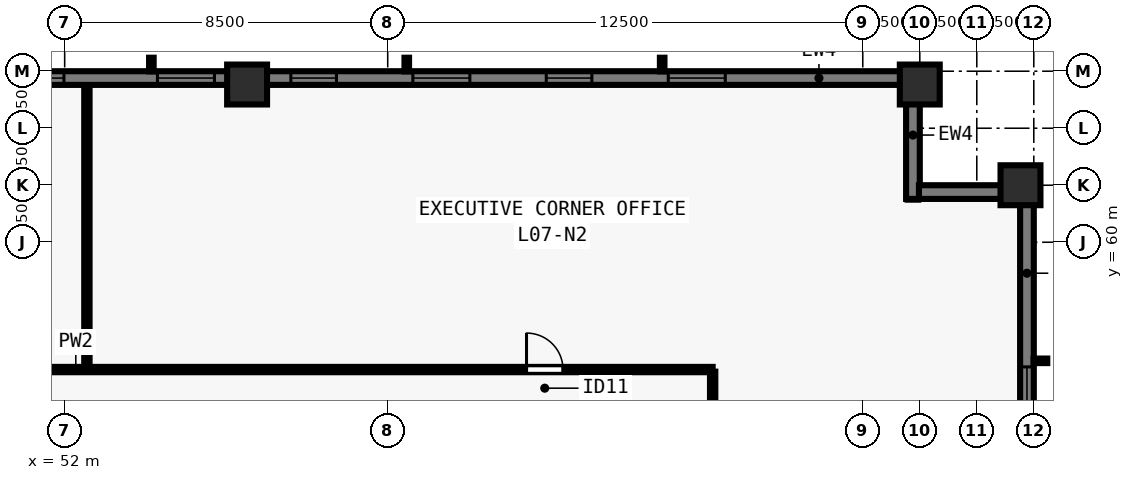
"""IFC4 building model, lengths in metres.
Left out: names, types, materials, properties, quantities, classifications, styles, units other than length and angle.
Written with IfcOpenShell. Run it as: python <this file> out.ifc"""

import sys

from ifc_helpers import new_model, si_unit, direction, frame, frame_2d, origin, origin_2d, place, context, subcontext, project, spatial, rectangle, extrude, element, fill, save


model = new_model("IFC4")
c1 = context("Model", 3, precision=1e-05, world=origin(), true_north=direction((0.0, 1.0)))
c2 = subcontext(c1, "Body", "Model", "MODEL_VIEW")
j1 = project(units=[si_unit("LENGTHUNIT", "METRE"), si_unit("PLANEANGLEUNIT", "RADIAN")], contexts=[c1])
p1 = place(None, origin())
s1 = spatial("IfcSite", under=j1, at=p1, CompositionType="ELEMENT")
p2 = place(p1, origin())
s2 = spatial("IfcBuilding", under=s1, at=p2, CompositionType="ELEMENT")
p3 = place(p2, frame((0.0, 0.0, 30.5)))
s3 = spatial("IfcBuildingStorey", under=s2, at=p3, CompositionType="ELEMENT", Elevation=30.5)
for number, where, z_axis, x_axis in (
    (1, (77.15, 61.5, 0.0), (0.0, 0.0, 1.0), (0.0, 1.0, 0.0)),
    (2, (74.5, 64.15, 0.0), (0.0, 0.0, 1.0), (1.0, 0.0, 0.0)),
    (3, (56.8, 64.15, 0.0), (0.0, 0.0, 1.0), (1.0, 0.0, 0.0)),
):
    element("IfcColumn", number, at=place(p3, frame(where, z_axis=z_axis, x_axis=x_axis)), inside=s3, PredefinedType="COLUMN", context=c2, shape_type="SweptSolid", body=[
        extrude(rectangle(XDim=1.05, YDim=1.05, at=origin_2d()), origin(), (0.0, 0.0, 1.0), 3.5),
    ])
p4 = place(p3, frame((29.5, 64.32, 0.0), z_axis=(0.0, 0.0, 1.0), x_axis=(1.0, 0.0, 0.0)))
e4 = element("IfcWall", 4, at=p4, inside=s3, PredefinedType="SOLIDWALL", context=c2, shape_type="SweptSolid", body=[
    extrude(rectangle(XDim=44.662, YDim=0.36, at=frame_2d((22.331, 0.0))), origin(), (0.0, 0.0, 1.0), 3.28),
])
p5 = place(p4, frame((4.78, 0.0, 0.8)))
e5 = element("IfcOpeningElement", 5, at=p5, cuts=e4, PredefinedType="OPENING", context=c2, shape_type="SweptSolid", body=[
    extrude(rectangle(XDim=1.5, YDim=1.544, at=frame_2d((0.75, 0.772))), frame((0.0, 0.19, 0.0), z_axis=(0.0, -1.0, 0.0), x_axis=(1.0, 0.0, 0.0)), (0.0, 0.0, 1.0), 0.38),
])
p6 = place(p4, frame((8.29, 0.0, 0.8)))
e6 = element("IfcOpeningElement", 6, at=p6, cuts=e4, PredefinedType="OPENING", context=c2, shape_type="SweptSolid", body=[
    extrude(rectangle(XDim=1.2, YDim=1.544, at=frame_2d((0.6, 0.772))), frame((0.0, 0.19, 0.0), z_axis=(0.0, -1.0, 0.0), x_axis=(1.0, 0.0, 0.0)), (0.0, 0.0, 1.0), 0.38),
])
p7 = place(p4, frame((11.5, 0.0, 0.8)))
e7 = element("IfcOpeningElement", 7, at=p7, cuts=e4, PredefinedType="OPENING", context=c2, shape_type="SweptSolid", body=[
    extrude(rectangle(XDim=1.5, YDim=1.544, at=frame_2d((0.75, 0.772))), frame((0.0, 0.19, 0.0), z_axis=(0.0, -1.0, 0.0), x_axis=(1.0, 0.0, 0.0)), (0.0, 0.0, 1.0), 0.38),
])
p8 = place(p4, frame((15.01, 0.0, 0.8)))
e8 = element("IfcOpeningElement", 8, at=p8, cuts=e4, PredefinedType="OPENING", context=c2, shape_type="SweptSolid", body=[
    extrude(rectangle(XDim=1.2, YDim=1.544, at=frame_2d((0.6, 0.772))), frame((0.0, 0.19, 0.0), z_axis=(0.0, -1.0, 0.0), x_axis=(1.0, 0.0, 0.0)), (0.0, 0.0, 1.0), 0.38),
])
p9 = place(p4, frame((18.671, 0.0, 0.8)))
e9 = element("IfcOpeningElement", 9, at=p9, cuts=e4, PredefinedType="OPENING", context=c2, shape_type="SweptSolid", body=[
    extrude(rectangle(XDim=1.5, YDim=1.544, at=frame_2d((0.75, 0.772))), frame((0.0, 0.19, 0.0), z_axis=(0.0, -1.0, 0.0), x_axis=(1.0, 0.0, 0.0)), (0.0, 0.0, 1.0), 0.38),
])
p10 = place(p4, frame((21.281, 0.0, 0.8)))
e10 = element("IfcOpeningElement", 10, at=p10, cuts=e4, PredefinedType="OPENING", context=c2, shape_type="SweptSolid", body=[
    extrude(rectangle(XDim=1.2, YDim=1.544, at=frame_2d((0.6, 0.772))), frame((0.0, 0.19, 0.0), z_axis=(0.0, -1.0, 0.0), x_axis=(1.0, 0.0, 0.0)), (0.0, 0.0, 1.0), 0.38),
])
p11 = place(p4, frame((24.941, 0.0, 0.8)))
e11 = element("IfcOpeningElement", 11, at=p11, cuts=e4, PredefinedType="OPENING", context=c2, shape_type="SweptSolid", body=[
    extrude(rectangle(XDim=1.5, YDim=1.544, at=frame_2d((0.75, 0.772))), frame((0.0, 0.19, 0.0), z_axis=(0.0, -1.0, 0.0), x_axis=(1.0, 0.0, 0.0)), (0.0, 0.0, 1.0), 0.38),
])
p12 = place(p4, frame((28.451, 0.0, 0.8)))
e12 = element("IfcOpeningElement", 12, at=p12, cuts=e4, PredefinedType="OPENING", context=c2, shape_type="SweptSolid", body=[
    extrude(rectangle(XDim=1.2, YDim=1.544, at=frame_2d((0.6, 0.772))), frame((0.0, 0.19, 0.0), z_axis=(0.0, -1.0, 0.0), x_axis=(1.0, 0.0, 0.0)), (0.0, 0.0, 1.0), 0.38),
])
p13 = place(p4, frame((31.662, 0.0, 0.8)))
e13 = element("IfcOpeningElement", 13, at=p13, cuts=e4, PredefinedType="OPENING", context=c2, shape_type="SweptSolid", body=[
    extrude(rectangle(XDim=1.5, YDim=1.544, at=frame_2d((0.75, 0.772))), frame((0.0, 0.19, 0.0), z_axis=(0.0, -1.0, 0.0), x_axis=(1.0, 0.0, 0.0)), (0.0, 0.0, 1.0), 0.38),
])
p14 = place(p4, frame((35.172, 0.0, 0.8)))
e14 = element("IfcOpeningElement", 14, at=p14, cuts=e4, PredefinedType="OPENING", context=c2, shape_type="SweptSolid", body=[
    extrude(rectangle(XDim=1.2, YDim=1.544, at=frame_2d((0.6, 0.772))), frame((0.0, 0.19, 0.0), z_axis=(0.0, -1.0, 0.0), x_axis=(1.0, 0.0, 0.0)), (0.0, 0.0, 1.0), 0.38),
])
p15 = place(p4, frame((38.382, 0.0, 0.8)))
e15 = element("IfcOpeningElement", 15, at=p15, cuts=e4, PredefinedType="OPENING", context=c2, shape_type="SweptSolid", body=[
    extrude(rectangle(XDim=1.5, YDim=1.544, at=frame_2d((0.75, 0.772))), frame((0.0, 0.19, 0.0), z_axis=(0.0, -1.0, 0.0), x_axis=(1.0, 0.0, 0.0)), (0.0, 0.0, 1.0), 0.38),
])
p16 = place(p3, frame((74.32, 64.5, 0.0), z_axis=(0.0, 0.0, 1.0), x_axis=(0.0, -1.0, 0.0)))
e16 = element("IfcWall", 16, at=p16, inside=s3, PredefinedType="SOLIDWALL", context=c2, shape_type="SweptSolid", body=[
    extrude(rectangle(XDim=3.36, YDim=0.36, at=frame_2d((1.68, 0.0))), origin(), (0.0, 0.0, 1.0), 3.28),
])
p17 = place(p3, frame((74.478, 61.32, 0.0), z_axis=(0.0, 0.0, 1.0), x_axis=(1.0, 0.0, 0.0)))
e17 = element("IfcWall", 17, at=p17, inside=s3, PredefinedType="SOLIDWALL", context=c2, shape_type="SweptSolid", body=[
    extrude(rectangle(XDim=2.684, YDim=0.36, at=frame_2d((1.342, 0.0))), origin(), (0.0, 0.0, 1.0), 3.28),
])
p18 = place(p3, frame((77.32, 61.5, 0.0), z_axis=(0.0, 0.0, 1.0), x_axis=(0.0, -1.0, 0.0)))
e18 = element("IfcWall", 18, at=p18, inside=s3, PredefinedType="SOLIDWALL", context=c2, shape_type="SweptSolid", body=[
    extrude(rectangle(XDim=44.662, YDim=0.36, at=frame_2d((22.331, 0.0))), origin(), (0.0, 0.0, 1.0), 3.28),
])
p19 = place(p18, frame((4.78, 0.0, 0.8)))
e19 = element("IfcOpeningElement", 19, at=p19, cuts=e18, PredefinedType="OPENING", context=c2, shape_type="SweptSolid", body=[
    extrude(rectangle(XDim=1.5, YDim=1.544, at=frame_2d((0.75, 0.772))), frame((0.0, 0.19, 0.0), z_axis=(0.0, -1.0, 0.0), x_axis=(1.0, 0.0, 0.0)), (0.0, 0.0, 1.0), 0.38),
])
p20 = place(p18, frame((8.29, 0.0, 0.8)))
e20 = element("IfcOpeningElement", 20, at=p20, cuts=e18, PredefinedType="OPENING", context=c2, shape_type="SweptSolid", body=[
    extrude(rectangle(XDim=1.2, YDim=1.544, at=frame_2d((0.6, 0.772))), frame((0.0, 0.19, 0.0), z_axis=(0.0, -1.0, 0.0), x_axis=(1.0, 0.0, 0.0)), (0.0, 0.0, 1.0), 0.38),
])
p21 = place(p18, frame((11.5, 0.0, 0.8)))
e21 = element("IfcOpeningElement", 21, at=p21, cuts=e18, PredefinedType="OPENING", context=c2, shape_type="SweptSolid", body=[
    extrude(rectangle(XDim=1.5, YDim=1.544, at=frame_2d((0.75, 0.772))), frame((0.0, 0.19, 0.0), z_axis=(0.0, -1.0, 0.0), x_axis=(1.0, 0.0, 0.0)), (0.0, 0.0, 1.0), 0.38),
])
p22 = place(p18, frame((15.01, 0.0, 0.8)))
e22 = element("IfcOpeningElement", 22, at=p22, cuts=e18, PredefinedType="OPENING", context=c2, shape_type="SweptSolid", body=[
    extrude(rectangle(XDim=1.2, YDim=1.544, at=frame_2d((0.6, 0.772))), frame((0.0, 0.19, 0.0), z_axis=(0.0, -1.0, 0.0), x_axis=(1.0, 0.0, 0.0)), (0.0, 0.0, 1.0), 0.38),
])
p23 = place(p18, frame((18.671, 0.0, 0.8)))
e23 = element("IfcOpeningElement", 23, at=p23, cuts=e18, PredefinedType="OPENING", context=c2, shape_type="SweptSolid", body=[
    extrude(rectangle(XDim=1.5, YDim=1.544, at=frame_2d((0.75, 0.772))), frame((0.0, 0.19, 0.0), z_axis=(0.0, -1.0, 0.0), x_axis=(1.0, 0.0, 0.0)), (0.0, 0.0, 1.0), 0.38),
])
p24 = place(p18, frame((22.581, 0.0, 0.8)))
e24 = element("IfcOpeningElement", 24, at=p24, cuts=e18, PredefinedType="OPENING", context=c2, shape_type="SweptSolid", body=[
    extrude(rectangle(XDim=1.2, YDim=1.544, at=frame_2d((0.6, 0.772))), frame((0.0, 0.19, 0.0), z_axis=(0.0, -1.0, 0.0), x_axis=(1.0, 0.0, 0.0)), (0.0, 0.0, 1.0), 0.38),
])
p25 = place(p18, frame((24.941, 0.0, 0.8)))
e25 = element("IfcOpeningElement", 25, at=p25, cuts=e18, PredefinedType="OPENING", context=c2, shape_type="SweptSolid", body=[
    extrude(rectangle(XDim=1.5, YDim=1.544, at=frame_2d((0.75, 0.772))), frame((0.0, 0.19, 0.0), z_axis=(0.0, -1.0, 0.0), x_axis=(1.0, 0.0, 0.0)), (0.0, 0.0, 1.0), 0.38),
])
p26 = place(p18, frame((28.451, 0.0, 0.8)))
e26 = element("IfcOpeningElement", 26, at=p26, cuts=e18, PredefinedType="OPENING", context=c2, shape_type="SweptSolid", body=[
    extrude(rectangle(XDim=1.2, YDim=1.544, at=frame_2d((0.6, 0.772))), frame((0.0, 0.19, 0.0), z_axis=(0.0, -1.0, 0.0), x_axis=(1.0, 0.0, 0.0)), (0.0, 0.0, 1.0), 0.38),
])
p27 = place(p18, frame((31.662, 0.0, 0.8)))
e27 = element("IfcOpeningElement", 27, at=p27, cuts=e18, PredefinedType="OPENING", context=c2, shape_type="SweptSolid", body=[
    extrude(rectangle(XDim=1.5, YDim=1.544, at=frame_2d((0.75, 0.772))), frame((0.0, 0.19, 0.0), z_axis=(0.0, -1.0, 0.0), x_axis=(1.0, 0.0, 0.0)), (0.0, 0.0, 1.0), 0.38),
])
p28 = place(p18, frame((35.172, 0.0, 0.8)))
e28 = element("IfcOpeningElement", 28, at=p28, cuts=e18, PredefinedType="OPENING", context=c2, shape_type="SweptSolid", body=[
    extrude(rectangle(XDim=1.2, YDim=1.544, at=frame_2d((0.6, 0.772))), frame((0.0, 0.19, 0.0), z_axis=(0.0, -1.0, 0.0), x_axis=(1.0, 0.0, 0.0)), (0.0, 0.0, 1.0), 0.38),
])
p29 = place(p18, frame((38.382, 0.0, 0.8)))
e29 = element("IfcOpeningElement", 29, at=p29, cuts=e18, PredefinedType="OPENING", context=c2, shape_type="SweptSolid", body=[
    extrude(rectangle(XDim=1.5, YDim=1.544, at=frame_2d((0.75, 0.772))), frame((0.0, 0.19, 0.0), z_axis=(0.0, -1.0, 0.0), x_axis=(1.0, 0.0, 0.0)), (0.0, 0.0, 1.0), 0.38),
])
p30 = place(p3, frame((34.95, 56.65, 0.0), z_axis=(0.0, 0.0, 1.0), x_axis=(1.0, 0.0, 0.0)))
e30 = element("IfcWall", 30, at=p30, inside=s3, PredefinedType="PARTITIONING", context=c2, shape_type="SweptSolid", body=[
    extrude(rectangle(XDim=34.1, YDim=0.14, at=frame_2d((17.05, 0.0))), origin(), (0.0, 0.0, 1.0), 3.28),
])
p31 = place(p30, frame((4.522, 0.0, 0.0)))
e31 = element("IfcOpeningElement", 31, at=p31, cuts=e30, PredefinedType="OPENING", context=c2, shape_type="SweptSolid", body=[
    extrude(rectangle(XDim=0.96, YDim=2.12, at=frame_2d((0.48, 1.06))), frame((0.0, 0.08, 0.0), z_axis=(0.0, -1.0, 0.0), x_axis=(1.0, 0.0, 0.0)), (0.0, 0.0, 1.0), 0.16),
])
p32 = place(p30, frame((29.202, 0.0, 0.0)))
e32 = element("IfcOpeningElement", 32, at=p32, cuts=e30, PredefinedType="OPENING", context=c2, shape_type="SweptSolid", body=[
    extrude(rectangle(XDim=0.96, YDim=2.12, at=frame_2d((0.48, 1.06))), frame((0.0, 0.08, 0.0), z_axis=(0.0, -1.0, 0.0), x_axis=(1.0, 0.0, 0.0)), (0.0, 0.0, 1.0), 0.16),
])
p33 = place(p3, frame((69.05, 21.405, 0.0), z_axis=(0.0, 0.0, 1.0), x_axis=(0.0, 1.0, 0.0)))
e33 = element("IfcWall", 33, at=p33, inside=s3, PredefinedType="PARTITIONING", context=c2, shape_type="SweptSolid", body=[
    extrude(rectangle(XDim=35.19, YDim=0.14, at=frame_2d((17.595, 0.0))), origin(), (0.0, 0.0, 1.0), 3.28),
])
p34 = place(p33, frame((8.545, 0.0, 0.0)))
e34 = element("IfcOpeningElement", 34, at=p34, cuts=e33, PredefinedType="OPENING", context=c2, shape_type="SweptSolid", body=[
    extrude(rectangle(XDim=0.96, YDim=2.12, at=frame_2d((0.48, 1.06))), frame((0.0, 0.08, 0.0), z_axis=(0.0, -1.0, 0.0), x_axis=(1.0, 0.0, 0.0)), (0.0, 0.0, 1.0), 0.16),
])
p35 = place(p33, frame((26.095, 0.0, 0.0)))
e35 = element("IfcOpeningElement", 35, at=p35, cuts=e33, PredefinedType="OPENING", context=c2, shape_type="SweptSolid", body=[
    extrude(rectangle(XDim=0.96, YDim=2.12, at=frame_2d((0.48, 1.06))), frame((0.0, 0.08, 0.0), z_axis=(0.0, -1.0, 0.0), x_axis=(1.0, 0.0, 0.0)), (0.0, 0.0, 1.0), 0.16),
])
p36 = place(p3, frame((52.585, 56.75, 0.0), z_axis=(0.0, 0.0, 1.0), x_axis=(0.0, 1.0, 0.0)))
e36 = element("IfcWall", 36, at=p36, inside=s3, PredefinedType="PARTITIONING", context=c2, shape_type="SweptSolid", body=[
    extrude(rectangle(XDim=7.33, YDim=0.14, at=frame_2d((3.665, 0.0))), origin(), (0.0, 0.0, 1.0), 2.849),
])
p37 = place(p10, origin())
e37 = element("IfcWindow", 37, at=p37, inside=s3, PartitioningType="SINGLE_PANEL", PredefinedType="WINDOW", context=c2, shape_type="SweptSolid", body=[
    extrude(rectangle(XDim=1.2, YDim=1.544, at=frame_2d((0.6, 0.772))), frame((0.0, -0.05, 0.0), z_axis=(0.0, -1.0, 0.0), x_axis=(1.0, 0.0, 0.0)), (0.0, 0.0, 1.0), 0.06),
])
fill(e10, e37)
p38 = place(p11, origin())
e38 = element("IfcWindow", 38, at=p38, inside=s3, PartitioningType="SINGLE_PANEL", PredefinedType="WINDOW", context=c2, shape_type="SweptSolid", body=[
    extrude(rectangle(XDim=1.5, YDim=1.544, at=frame_2d((0.75, 0.772))), frame((0.0, -0.05, 0.0), z_axis=(0.0, -1.0, 0.0), x_axis=(1.0, 0.0, 0.0)), (0.0, 0.0, 1.0), 0.06),
])
fill(e11, e38)
p39 = place(p12, origin())
e39 = element("IfcWindow", 39, at=p39, inside=s3, PartitioningType="SINGLE_PANEL", PredefinedType="WINDOW", context=c2, shape_type="SweptSolid", body=[
    extrude(rectangle(XDim=1.2, YDim=1.544, at=frame_2d((0.6, 0.772))), frame((0.0, -0.05, 0.0), z_axis=(0.0, -1.0, 0.0), x_axis=(1.0, 0.0, 0.0)), (0.0, 0.0, 1.0), 0.06),
])
fill(e12, e39)
p40 = place(p13, origin())
e40 = element("IfcWindow", 40, at=p40, inside=s3, PartitioningType="SINGLE_PANEL", PredefinedType="WINDOW", context=c2, shape_type="SweptSolid", body=[
    extrude(rectangle(XDim=1.5, YDim=1.544, at=frame_2d((0.75, 0.772))), frame((0.0, -0.05, 0.0), z_axis=(0.0, -1.0, 0.0), x_axis=(1.0, 0.0, 0.0)), (0.0, 0.0, 1.0), 0.06),
])
fill(e13, e40)
p41 = place(p14, origin())
e41 = element("IfcWindow", 41, at=p41, inside=s3, PartitioningType="SINGLE_PANEL", PredefinedType="WINDOW", context=c2, shape_type="SweptSolid", body=[
    extrude(rectangle(XDim=1.2, YDim=1.544, at=frame_2d((0.6, 0.772))), frame((0.0, -0.05, 0.0), z_axis=(0.0, -1.0, 0.0), x_axis=(1.0, 0.0, 0.0)), (0.0, 0.0, 1.0), 0.06),
])
fill(e14, e41)
p42 = place(p15, origin())
e42 = element("IfcWindow", 42, at=p42, inside=s3, PartitioningType="SINGLE_PANEL", PredefinedType="WINDOW", context=c2, shape_type="SweptSolid", body=[
    extrude(rectangle(XDim=1.5, YDim=1.544, at=frame_2d((0.75, 0.772))), frame((0.0, -0.05, 0.0), z_axis=(0.0, -1.0, 0.0), x_axis=(1.0, 0.0, 0.0)), (0.0, 0.0, 1.0), 0.06),
])
fill(e15, e42)
p43 = place(p19, origin())
e43 = element("IfcWindow", 43, at=p43, inside=s3, PartitioningType="SINGLE_PANEL", PredefinedType="WINDOW", context=c2, shape_type="SweptSolid", body=[
    extrude(rectangle(XDim=1.5, YDim=1.544, at=frame_2d((0.75, 0.772))), frame((0.0, -0.05, 0.0), z_axis=(0.0, -1.0, 0.0), x_axis=(1.0, 0.0, 0.0)), (0.0, 0.0, 1.0), 0.06),
])
fill(e19, e43)
p44 = place(p32, origin())
e44 = element("IfcDoor", 44, at=p44, inside=s3, OperationType="SINGLE_SWING_LEFT", PredefinedType="DOOR", context=c2, shape_type="SweptSolid", body=[
    extrude(rectangle(XDim=0.96, YDim=2.12, at=frame_2d((0.48, 1.06))), frame((0.0, 0.025, 0.0), z_axis=(0.0, -1.0, 0.0), x_axis=(1.0, 0.0, 0.0)), (0.0, 0.0, 1.0), 0.05),
])
fill(e32, e44)
save(model, sys.argv[1])
